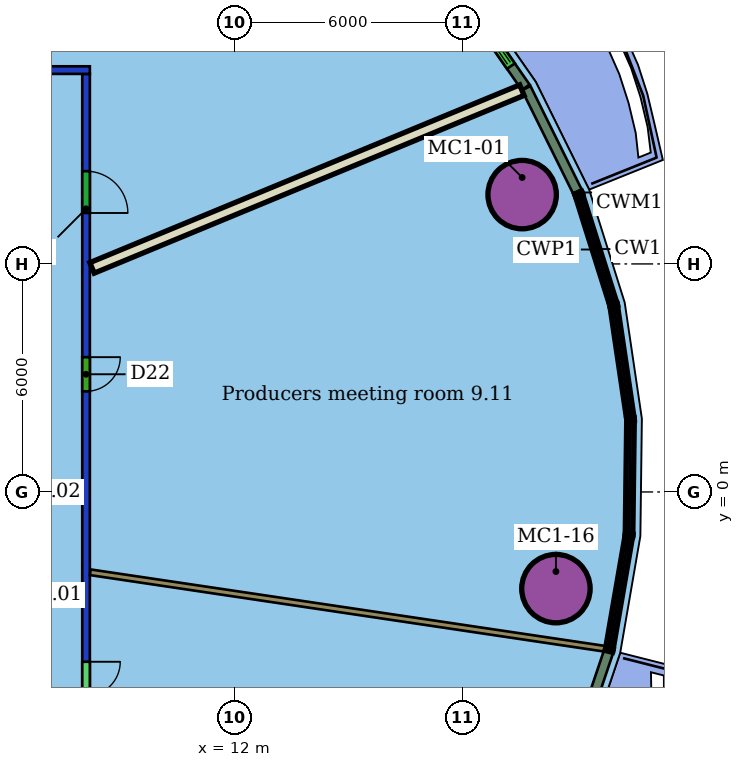
"""IFC4 building model, lengths in metres.
Left out: names, types, materials, properties, quantities, classifications, styles, units other than length and angle.
Written with IfcOpenShell. Run it as: python <this file> out.ifc"""

import sys

from ifc_helpers import new_model, si_unit, direction, frame, frame_2d, origin, origin_2d, place, context, subcontext, project, spatial, rectangle, hollow_circle, extrude, element, fill, save


model = new_model("IFC4")
c1 = context("Model", 3, precision=1e-05, world=origin(), true_north=direction((0.0, 1.0)))
c2 = subcontext(c1, "Body", "Model", "MODEL_VIEW")
j1 = project(units=[si_unit("LENGTHUNIT", "METRE"), si_unit("PLANEANGLEUNIT", "RADIAN")], contexts=[c1])
p1 = place(None, origin())
s1 = spatial("IfcSite", under=j1, at=p1, CompositionType="ELEMENT")
p2 = place(p1, origin())
s2 = spatial("IfcBuilding", under=s1, at=p2, CompositionType="ELEMENT")
p3 = place(p2, frame((0.0, 0.0, 50.8)))
s3 = spatial("IfcBuildingStorey", under=s2, at=p3, CompositionType="ELEMENT", Elevation=50.8)
for number, where, z_axis, x_axis in (
    (1, (19.575, 7.824, 0.0), (0.0, 0.0, 1.0), (1.0, 0.0, 0.0)),
    (2, (20.464, -2.543, 0.0), (0.0, 0.0, 1.0), (1.0, 0.0, 0.0)),
):
    element("IfcColumn", number, at=place(p3, frame(where, z_axis=z_axis, x_axis=x_axis)), inside=s3, PredefinedType="COLUMN", context=c2, shape_type="SweptSolid", body=[
        extrude(hollow_circle(Radius=0.9, WallThickness=0.06, at=origin_2d()), origin(), (0.0, 0.0, 1.0), 3.55),
    ])
p4 = place(p3, frame((-20.2, 11.1, 0.0), z_axis=(0.0, 0.0, 1.0), x_axis=(1.0, 0.0, 0.0)))
e3 = element("IfcWall", 3, at=p4, inside=s3, PredefinedType="PARTITIONING", context=c2, shape_type="SweptSolid", body=[
    extrude(rectangle(XDim=28.4, YDim=0.2, at=frame_2d((14.2, 0.0))), origin(), (0.0, 0.0, 1.0), 2.85),
])
p5 = place(p4, frame((19.389, 0.0, 0.0)))
e4 = element("IfcOpeningElement", 4, at=p5, cuts=e3, PredefinedType="OPENING", context=c2, shape_type="SweptSolid", body=[
    extrude(rectangle(XDim=1.2, YDim=2.1, at=frame_2d((0.6, 1.05))), frame((0.0, 0.11, 0.0), z_axis=(0.0, -1.0, 0.0), x_axis=(1.0, 0.0, 0.0)), (0.0, 0.0, 1.0), 0.22),
])
p6 = place(p4, frame((10.549, 0.0, 0.0)))
e5 = element("IfcOpeningElement", 5, at=p6, cuts=e3, PredefinedType="OPENING", context=c2, shape_type="SweptSolid", body=[
    extrude(rectangle(XDim=1.5, YDim=2.1, at=frame_2d((0.75, 1.05))), frame((0.0, 0.11, 0.0), z_axis=(0.0, -1.0, 0.0), x_axis=(1.0, 0.0, 0.0)), (0.0, 0.0, 1.0), 0.22),
])
p7 = place(p4, frame((5.794, 0.0, 0.0)))
e6 = element("IfcOpeningElement", 6, at=p7, cuts=e3, PredefinedType="OPENING", context=c2, shape_type="SweptSolid", body=[
    extrude(rectangle(XDim=1.1, YDim=2.1, at=frame_2d((0.55, 1.05))), frame((0.0, 0.11, 0.0), z_axis=(0.0, -1.0, 0.0), x_axis=(1.0, 0.0, 0.0)), (0.0, 0.0, 1.0), 0.22),
])
p8 = place(p3, frame((8.1, 11.0, 0.0), z_axis=(0.0, 0.0, 1.0), x_axis=(0.0, -1.0, 0.0)))
e7 = element("IfcWall", 7, at=p8, inside=s3, PredefinedType="PARTITIONING", context=c2, shape_type="SweptSolid", body=[
    extrude(rectangle(XDim=22.0, YDim=0.2, at=frame_2d((11.0, 0.0))), origin(), (0.0, 0.0, 1.0), 2.85),
])
p9 = place(p8, frame((2.56, 0.0, 0.0)))
e8 = element("IfcOpeningElement", 8, at=p9, cuts=e7, PredefinedType="OPENING", context=c2, shape_type="SweptSolid", body=[
    extrude(rectangle(XDim=1.1, YDim=2.1, at=frame_2d((0.55, 1.05))), frame((0.0, 0.11, 0.0), z_axis=(0.0, -1.0, 0.0), x_axis=(1.0, 0.0, 0.0)), (0.0, 0.0, 1.0), 0.22),
])
p10 = place(p8, frame((15.468, 0.0, 0.0)))
e9 = element("IfcOpeningElement", 9, at=p10, cuts=e7, PredefinedType="OPENING", context=c2, shape_type="SweptSolid", body=[
    extrude(rectangle(XDim=1.8, YDim=2.1, at=frame_2d((0.9, 1.05))), frame((0.0, 0.11, 0.0), z_axis=(0.0, -1.0, 0.0), x_axis=(1.0, 0.0, 0.0)), (0.0, 0.0, 1.0), 0.22),
])
p11 = place(p8, frame((7.453, 0.0, 0.0)))
e10 = element("IfcOpeningElement", 10, at=p11, cuts=e7, PredefinedType="OPENING", context=c2, shape_type="SweptSolid", body=[
    extrude(rectangle(XDim=0.9, YDim=2.1, at=frame_2d((0.45, 1.05))), frame((0.0, 0.11, 0.0), z_axis=(0.0, -1.0, 0.0), x_axis=(1.0, 0.0, 0.0)), (0.0, 0.0, 1.0), 0.22),
])
p12 = place(p3, frame((19.569, 10.573, 0.0), z_axis=(0.0, 0.0, 1.0), x_axis=(-0.924113266053, -0.382118661551, 0.0)))
e11 = element("IfcWall", 11, at=p12, inside=s3, PredefinedType="PARTITIONING", context=c2, shape_type="SweptSolid", body=[
    extrude(rectangle(XDim=12.241, YDim=0.3, at=frame_2d((6.121, 0.0))), origin(), (0.0, 0.0, 1.0), 3.55),
])
p13 = place(p3, frame((10.032, 19.475, 0.0), z_axis=(0.0, 0.0, 1.0), x_axis=(-0.635573968838, -0.772039979623, 0.0)))
e12 = element("IfcWall", 12, at=p13, inside=s3, PredefinedType="PARTITIONING", context=c2, shape_type="SweptSolid", body=[
    extrude(rectangle(XDim=10.594, YDim=0.3, at=frame_2d((5.297, 0.0))), origin(), (0.0, 0.0, 1.0), 3.55),
])
p14 = place(p3, frame((21.744, -4.125, 0.0), z_axis=(0.0, 0.0, 1.0), x_axis=(-0.989126490961, 0.147067280113, 0.0)))
e13 = element("IfcWall", 13, at=p14, inside=s3, PredefinedType="PARTITIONING", context=c2, shape_type="SweptSolid", body=[
    extrude(rectangle(XDim=13.682, YDim=0.15, at=frame_2d((6.841, 0.0))), origin(), (0.0, 0.0, 1.0), 3.55),
])
p15 = place(p3, frame((21.036, 7.892, 0.0), z_axis=(0.0, 0.0, 1.0), x_axis=(-0.443751201737, 0.896150027036, 0.0)))
e14 = element("IfcWall", 14, at=p15, inside=s3, PredefinedType="SOLIDWALL", context=c2, shape_type="SweptSolid", body=[
    extrude(rectangle(XDim=3.049, YDim=0.25, at=frame_2d((1.524, 0.0))), origin(), (0.0, 0.0, 1.0), 3.15),
])
p16 = place(p3, frame((19.669, 10.647, 0.0), z_axis=(0.0, 0.0, 1.0), x_axis=(-0.571854103807, 0.820355340056, 0.0)))
e15 = element("IfcWall", 15, at=p16, inside=s3, PredefinedType="SOLIDWALL", context=c2, shape_type="SweptSolid", body=[
    extrude(rectangle(XDim=3.161, YDim=0.25, at=frame_2d((1.58, 0.0))), origin(), (0.0, 0.0, 1.0), 3.15),
])
p17 = place(p16, frame((0.68, 0.0, 0.0)))
e16 = element("IfcOpeningElement", 16, at=p17, cuts=e15, PredefinedType="OPENING", context=c2, shape_type="SweptSolid", body=[
    extrude(rectangle(XDim=1.8, YDim=2.4, at=frame_2d((0.9, 1.2))), frame((0.0, 0.135, 0.0), z_axis=(0.0, -1.0, 0.0), x_axis=(1.0, 0.0, 0.0)), (0.0, 0.0, 1.0), 0.27),
])
p18 = place(p3, frame((20.872, -7.097, 0.0), z_axis=(0.0, 0.0, 1.0), x_axis=(0.319948454673, 0.947434950987, 0.0)))
e17 = element("IfcWall", 17, at=p18, inside=s3, PredefinedType="SOLIDWALL", context=c2, shape_type="SweptSolid", body=[
    extrude(rectangle(XDim=3.049, YDim=0.25, at=frame_2d((1.525, 0.0))), origin(), (0.0, 0.0, 1.0), 3.15),
])
p19 = place(p9, origin())
e18 = element("IfcDoor", 18, at=p19, inside=s3, OperationType="SINGLE_SWING_RIGHT", PredefinedType="DOOR", context=c2, shape_type="SweptSolid", body=[
    extrude(rectangle(XDim=1.1, YDim=2.1, at=frame_2d((0.55, 1.05))), frame((0.0, 0.025, 0.0), z_axis=(0.0, -1.0, 0.0), x_axis=(1.0, 0.0, 0.0)), (0.0, 0.0, 1.0), 0.05),
])
fill(e8, e18)
p20 = place(p10, origin())
e19 = element("IfcDoor", 19, at=p20, inside=s3, OperationType="DOUBLE_DOOR_SINGLE_SWING", PredefinedType="DOOR", context=c2, shape_type="SweptSolid", body=[
    extrude(rectangle(XDim=1.8, YDim=2.1, at=frame_2d((0.9, 1.05))), frame((0.0, 0.025, 0.0), z_axis=(0.0, -1.0, 0.0), x_axis=(1.0, 0.0, 0.0)), (0.0, 0.0, 1.0), 0.05),
])
fill(e9, e19)
p21 = place(p11, origin())
e20 = element("IfcDoor", 20, at=p21, inside=s3, OperationType="SINGLE_SWING_LEFT", PredefinedType="DOOR", context=c2, shape_type="SweptSolid", body=[
    extrude(rectangle(XDim=0.9, YDim=2.1, at=frame_2d((0.45, 1.05))), frame((0.0, 0.025, 0.0), z_axis=(0.0, -1.0, 0.0), x_axis=(1.0, 0.0, 0.0)), (0.0, 0.0, 1.0), 0.05),
])
fill(e10, e20)
p22 = place(p17, origin())
e21 = element("IfcDoor", 21, at=p22, inside=s3, OperationType="DOUBLE_DOOR_SLIDING", PredefinedType="DOOR", context=c2, shape_type="SweptSolid", body=[
    extrude(rectangle(XDim=1.8, YDim=2.4, at=frame_2d((0.9, 1.2))), frame((0.0, 0.025, 0.0), z_axis=(0.0, -1.0, 0.0), x_axis=(1.0, 0.0, 0.0)), (0.0, 0.0, 1.0), 0.05),
])
fill(e16, e21)
save(model, sys.argv[1])
